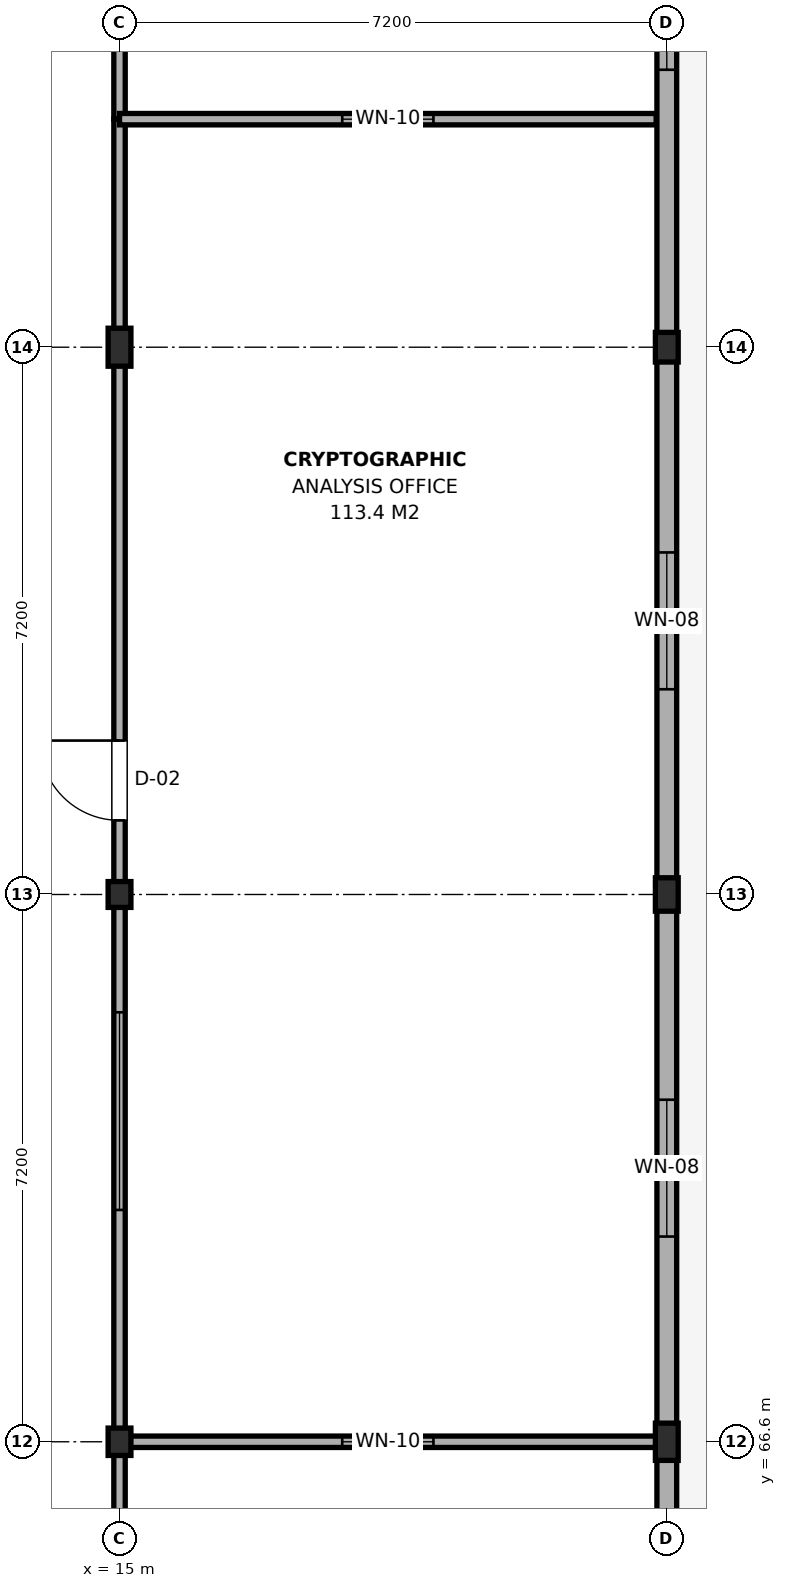
"""IFC4 building model, lengths in metres.
Left out: names, types, materials, properties, quantities, classifications, styles, units other than length and angle.
Written with IfcOpenShell. Run it as: python <this file> out.ifc"""

import sys

from ifc_helpers import new_model, si_unit, direction, frame, frame_2d, origin, origin_2d, place, context, subcontext, project, spatial, rectangle, i_section, extrude, element, fill, save


model = new_model("IFC4")
c1 = context("Model", 3, precision=1e-05, world=origin(), true_north=direction((0.0, 1.0)))
c2 = subcontext(c1, "Body", "Model", "MODEL_VIEW")
j1 = project(units=[si_unit("LENGTHUNIT", "METRE"), si_unit("PLANEANGLEUNIT", "RADIAN")], contexts=[c1])
p1 = place(None, origin())
s1 = spatial("IfcSite", under=j1, at=p1, CompositionType="ELEMENT")
p2 = place(p1, origin())
s2 = spatial("IfcBuilding", under=s1, at=p2, CompositionType="ELEMENT")
p3 = place(p2, frame((0.0, 0.0, 21.0)))
s3 = spatial("IfcBuildingStorey", under=s2, at=p3, CompositionType="ELEMENT", Elevation=21.0)
p4 = place(p3, frame((15.0, 66.6, 0.0), z_axis=(0.0, 0.0, 1.0), x_axis=(1.0, 0.0, 0.0)))
e1 = element("IfcColumn", 1, at=p4, inside=s3, PredefinedType="COLUMN", context=c2, shape_type="SweptSolid", body=[
    extrude(i_section(OverallWidth=0.3, OverallDepth=0.36, WebThickness=0.012, FlangeThickness=0.022, FilletRadius=0.027, at=origin_2d()), origin(), (0.0, 0.0, 1.0), 3.9),
])
p5 = place(p3, frame((15.0, 73.8, 0.0), z_axis=(0.0, 0.0, 1.0), x_axis=(1.0, 0.0, 0.0)))
e2 = element("IfcColumn", 2, at=p5, inside=s3, PredefinedType="COLUMN", context=c2, shape_type="SweptSolid", body=[
    extrude(i_section(OverallWidth=0.3, OverallDepth=0.34, WebThickness=0.012, FlangeThickness=0.021, FilletRadius=0.027, at=origin_2d()), origin(), (0.0, 0.0, 1.0), 3.9),
])
p6 = place(p3, frame((15.0, 81.0, 0.0), z_axis=(0.0, 0.0, 1.0), x_axis=(1.0, 0.0, 0.0)))
e3 = element("IfcColumn", 3, at=p6, inside=s3, PredefinedType="COLUMN", context=c2, shape_type="SweptSolid", body=[
    extrude(i_section(OverallWidth=0.3, OverallDepth=0.5, WebThickness=0.014, FlangeThickness=0.028, FilletRadius=0.027, at=origin_2d()), origin(), (0.0, 0.0, 1.0), 3.9),
])
p7 = place(p3, frame((22.2, 66.6, 0.0), z_axis=(0.0, 0.0, 1.0), x_axis=(1.0, 0.0, 0.0)))
e4 = element("IfcColumn", 4, at=p7, inside=s3, PredefinedType="COLUMN", context=c2, shape_type="SweptSolid", body=[
    extrude(i_section(OverallWidth=0.3, OverallDepth=0.49, WebThickness=0.012, FlangeThickness=0.023, FilletRadius=0.027, at=origin_2d()), origin(), (0.0, 0.0, 1.0), 3.9),
])
p8 = place(p3, frame((22.2, 73.8, 0.0), z_axis=(0.0, 0.0, 1.0), x_axis=(1.0, 0.0, 0.0)))
e5 = element("IfcColumn", 5, at=p8, inside=s3, PredefinedType="COLUMN", context=c2, shape_type="SweptSolid", body=[
    extrude(i_section(OverallWidth=0.3, OverallDepth=0.44, WebThickness=0.011, FlangeThickness=0.021, FilletRadius=0.027, at=origin_2d()), origin(), (0.0, 0.0, 1.0), 3.9),
])
p9 = place(p3, frame((22.2, 81.0, 0.0), z_axis=(0.0, 0.0, 1.0), x_axis=(1.0, 0.0, 0.0)))
e6 = element("IfcColumn", 6, at=p9, inside=s3, PredefinedType="COLUMN", context=c2, shape_type="SweptSolid", body=[
    extrude(i_section(OverallWidth=0.3, OverallDepth=0.39, WebThickness=0.011, FlangeThickness=0.019, FilletRadius=0.027, at=origin_2d()), origin(), (0.0, 0.0, 1.0), 3.9),
])
p10 = place(p3, frame((22.2, 58.8, 0.0), z_axis=(0.0, 0.0, 1.0), x_axis=(0.0, 1.0, 0.0)))
e7 = element("IfcWall", 7, at=p10, inside=s3, PredefinedType="SOLIDWALL", context=c2, shape_type="SweptSolid", body=[
    extrude(rectangle(XDim=7.8, YDim=0.26, at=frame_2d((3.9, 0.0))), origin(), (0.0, 0.0, 1.0), 3.245),
])
p11 = place(p10, frame((2.7, 0.0, 0.9)))
e8 = element("IfcOpeningElement", 8, at=p11, cuts=e7, PredefinedType="OPENING", context=c2, shape_type="SweptSolid", body=[
    extrude(rectangle(XDim=2.4, YDim=2.1, at=frame_2d((1.2, 1.05))), frame((0.0, 0.145, 0.0), z_axis=(0.0, -1.0, 0.0), x_axis=(1.0, 0.0, 0.0)), (0.0, 0.0, 1.0), 0.29),
])
p12 = place(p3, frame((22.2, 66.6, 0.0), z_axis=(0.0, 0.0, 1.0), x_axis=(0.0, 1.0, 0.0)))
e9 = element("IfcWall", 9, at=p12, inside=s3, PredefinedType="SOLIDWALL", context=c2, shape_type="SweptSolid", body=[
    extrude(rectangle(XDim=7.2, YDim=0.26, at=frame_2d((3.6, 0.0))), origin(), (0.0, 0.0, 1.0), 3.095),
])
p13 = place(p12, frame((2.7, 0.0, 0.65)))
e10 = element("IfcOpeningElement", 10, at=p13, cuts=e9, PredefinedType="OPENING", context=c2, shape_type="SweptSolid", body=[
    extrude(rectangle(XDim=1.8, YDim=1.2, at=frame_2d((0.9, 0.6))), frame((0.0, 0.145, 0.0), z_axis=(0.0, -1.0, 0.0), x_axis=(1.0, 0.0, 0.0)), (0.0, 0.0, 1.0), 0.29),
])
p14 = place(p3, frame((22.2, 73.8, 0.0), z_axis=(0.0, 0.0, 1.0), x_axis=(0.0, 1.0, 0.0)))
e11 = element("IfcWall", 11, at=p14, inside=s3, PredefinedType="SOLIDWALL", context=c2, shape_type="SweptSolid", body=[
    extrude(rectangle(XDim=7.2, YDim=0.26, at=frame_2d((3.6, 0.0))), origin(), (0.0, 0.0, 1.0), 3.095),
])
p15 = place(p14, frame((2.7, 0.0, 0.65)))
e12 = element("IfcOpeningElement", 12, at=p15, cuts=e11, PredefinedType="OPENING", context=c2, shape_type="SweptSolid", body=[
    extrude(rectangle(XDim=1.8, YDim=1.2, at=frame_2d((0.9, 0.6))), frame((0.0, 0.145, 0.0), z_axis=(0.0, -1.0, 0.0), x_axis=(1.0, 0.0, 0.0)), (0.0, 0.0, 1.0), 0.29),
])
p16 = place(p3, frame((22.2, 81.0, 0.0), z_axis=(0.0, 0.0, 1.0), x_axis=(0.0, 1.0, 0.0)))
e13 = element("IfcWall", 13, at=p16, inside=s3, PredefinedType="SOLIDWALL", context=c2, shape_type="SweptSolid", body=[
    extrude(rectangle(XDim=7.2, YDim=0.26, at=frame_2d((3.6, 0.0))), origin(), (0.0, 0.0, 1.0), 3.095),
])
p17 = place(p16, frame((3.65, 0.0, 0.65)))
e14 = element("IfcOpeningElement", 14, at=p17, cuts=e13, PredefinedType="OPENING", context=c2, shape_type="SweptSolid", body=[
    extrude(rectangle(XDim=1.8, YDim=1.2, at=frame_2d((0.9, 0.6))), frame((0.0, 0.145, 0.0), z_axis=(0.0, -1.0, 0.0), x_axis=(1.0, 0.0, 0.0)), (0.0, 0.0, 1.0), 0.29),
])
p18 = place(p3, frame((15.0, 50.4, 0.0), z_axis=(0.0, 0.0, 1.0), x_axis=(0.0, 1.0, 0.0)))
e15 = element("IfcWall", 15, at=p18, inside=s3, PredefinedType="PARTITIONING", context=c2, shape_type="SweptSolid", body=[
    extrude(rectangle(XDim=16.2, YDim=0.15, at=frame_2d((8.1, 0.0))), origin(), (0.0, 0.0, 1.0), 3.095),
])
p19 = place(p18, frame((7.125, 0.0, 0.0)))
e16 = element("IfcOpeningElement", 16, at=p19, cuts=e15, PredefinedType="OPENING", context=c2, shape_type="SweptSolid", body=[
    extrude(rectangle(XDim=1.05, YDim=2.15, at=frame_2d((0.525, 1.075))), frame((0.0, 0.09, 0.0), z_axis=(0.0, -1.0, 0.0), x_axis=(1.0, 0.0, 0.0)), (0.0, 0.0, 1.0), 0.18),
])
p20 = place(p18, frame((10.85, 0.0, 0.95)))
e17 = element("IfcOpeningElement", 17, at=p20, cuts=e15, PredefinedType="OPENING", context=c2, shape_type="SweptSolid", body=[
    extrude(rectangle(XDim=2.6, YDim=1.5, at=frame_2d((1.3, 0.75))), frame((0.0, 0.09, 0.0), z_axis=(0.0, -1.0, 0.0), x_axis=(1.0, 0.0, 0.0)), (0.0, 0.0, 1.0), 0.18),
])
p21 = place(p3, frame((15.0, 66.6, 0.0), z_axis=(0.0, 0.0, 1.0), x_axis=(0.0, 1.0, 0.0)))
e18 = element("IfcWall", 18, at=p21, inside=s3, PredefinedType="PARTITIONING", context=c2, shape_type="SweptSolid", body=[
    extrude(rectangle(XDim=17.4, YDim=0.15, at=frame_2d((8.7, 0.0))), origin(), (0.0, 0.0, 1.0), 3.095),
])
p22 = place(p21, frame((8.175, 0.0, 0.0)))
e19 = element("IfcOpeningElement", 19, at=p22, cuts=e18, PredefinedType="OPENING", context=c2, shape_type="SweptSolid", body=[
    extrude(rectangle(XDim=1.05, YDim=2.15, at=frame_2d((0.525, 1.075))), frame((0.0, 0.09, 0.0), z_axis=(0.0, -1.0, 0.0), x_axis=(1.0, 0.0, 0.0)), (0.0, 0.0, 1.0), 0.18),
])
p23 = place(p21, frame((3.05, 0.0, 0.95)))
e20 = element("IfcOpeningElement", 20, at=p23, cuts=e18, PredefinedType="OPENING", context=c2, shape_type="SweptSolid", body=[
    extrude(rectangle(XDim=2.6, YDim=1.5, at=frame_2d((1.3, 0.75))), frame((0.0, 0.09, 0.0), z_axis=(0.0, -1.0, 0.0), x_axis=(1.0, 0.0, 0.0)), (0.0, 0.0, 1.0), 0.18),
])
p24 = place(p3, frame((15.0, 66.6, 0.0), z_axis=(0.0, 0.0, 1.0), x_axis=(1.0, 0.0, 0.0)))
e21 = element("IfcWall", 21, at=p24, inside=s3, PredefinedType="PARTITIONING", context=c2, shape_type="SweptSolid", body=[
    extrude(rectangle(XDim=7.06, YDim=0.15, at=frame_2d((3.53, 0.0))), origin(), (0.0, 0.0, 1.0), 3.245),
])
p25 = place(p24, frame((2.93, 0.0, 0.95)))
e22 = element("IfcOpeningElement", 22, at=p25, cuts=e21, PredefinedType="OPENING", context=c2, shape_type="SweptSolid", body=[
    extrude(rectangle(XDim=1.2, YDim=1.5, at=frame_2d((0.6, 0.75))), frame((0.0, 0.09, 0.0), z_axis=(0.0, -1.0, 0.0), x_axis=(1.0, 0.0, 0.0)), (0.0, 0.0, 1.0), 0.18),
])
p26 = place(p3, frame((15.0, 84.0, 0.0), z_axis=(0.0, 0.0, 1.0), x_axis=(0.0, 1.0, 0.0)))
e23 = element("IfcWall", 23, at=p26, inside=s3, PredefinedType="PARTITIONING", context=c2, shape_type="SweptSolid", body=[
    extrude(rectangle(XDim=20.4, YDim=0.15, at=frame_2d((10.2, 0.0))), origin(), (0.0, 0.0, 1.0), 3.095),
])
p27 = place(p26, frame((9.4, 0.0, 0.0)))
e24 = element("IfcOpeningElement", 24, at=p27, cuts=e23, PredefinedType="OPENING", context=c2, shape_type="SweptSolid", body=[
    extrude(rectangle(XDim=1.6, YDim=2.15, at=frame_2d((0.8, 1.075))), frame((0.0, 0.09, 0.0), z_axis=(0.0, -1.0, 0.0), x_axis=(1.0, 0.0, 0.0)), (0.0, 0.0, 1.0), 0.18),
])
p28 = place(p26, frame((14.0, 0.0, 0.95)))
e25 = element("IfcOpeningElement", 25, at=p28, cuts=e23, PredefinedType="OPENING", context=c2, shape_type="SweptSolid", body=[
    extrude(rectangle(XDim=2.6, YDim=1.5, at=frame_2d((1.3, 0.75))), frame((0.0, 0.09, 0.0), z_axis=(0.0, -1.0, 0.0), x_axis=(1.0, 0.0, 0.0)), (0.0, 0.0, 1.0), 0.18),
])
p29 = place(p3, frame((15.0, 84.0, 0.0), z_axis=(0.0, 0.0, 1.0), x_axis=(1.0, 0.0, 0.0)))
e26 = element("IfcWall", 26, at=p29, inside=s3, PredefinedType="PARTITIONING", context=c2, shape_type="SweptSolid", body=[
    extrude(rectangle(XDim=7.06, YDim=0.15, at=frame_2d((3.53, 0.0))), origin(), (0.0, 0.0, 1.0), 3.145),
])
p30 = place(p29, frame((2.93, 0.0, 0.95)))
e27 = element("IfcOpeningElement", 27, at=p30, cuts=e26, PredefinedType="OPENING", context=c2, shape_type="SweptSolid", body=[
    extrude(rectangle(XDim=1.2, YDim=1.5, at=frame_2d((0.6, 0.75))), frame((0.0, 0.09, 0.0), z_axis=(0.0, -1.0, 0.0), x_axis=(1.0, 0.0, 0.0)), (0.0, 0.0, 1.0), 0.18),
])
p31 = place(p13, origin())
e28 = element("IfcWindow", 28, at=p31, inside=s3, PartitioningType="SINGLE_PANEL", PredefinedType="WINDOW", context=c2, shape_type="SweptSolid", body=[
    extrude(rectangle(XDim=1.8, YDim=1.2, at=frame_2d((0.9, 0.6))), frame((0.0, 0.03, 0.0), z_axis=(0.0, -1.0, 0.0), x_axis=(1.0, 0.0, 0.0)), (0.0, 0.0, 1.0), 0.06),
])
fill(e10, e28)
p32 = place(p15, origin())
e29 = element("IfcWindow", 29, at=p32, inside=s3, PartitioningType="SINGLE_PANEL", PredefinedType="WINDOW", context=c2, shape_type="SweptSolid", body=[
    extrude(rectangle(XDim=1.8, YDim=1.2, at=frame_2d((0.9, 0.6))), frame((0.0, 0.03, 0.0), z_axis=(0.0, -1.0, 0.0), x_axis=(1.0, 0.0, 0.0)), (0.0, 0.0, 1.0), 0.06),
])
fill(e12, e29)
p33 = place(p17, origin())
e30 = element("IfcWindow", 30, at=p33, inside=s3, PartitioningType="SINGLE_PANEL", PredefinedType="WINDOW", context=c2, shape_type="SweptSolid", body=[
    extrude(rectangle(XDim=1.8, YDim=1.2, at=frame_2d((0.9, 0.6))), frame((0.0, 0.03, 0.0), z_axis=(0.0, -1.0, 0.0), x_axis=(1.0, 0.0, 0.0)), (0.0, 0.0, 1.0), 0.06),
])
fill(e14, e30)
p34 = place(p22, origin())
e31 = element("IfcDoor", 31, at=p34, inside=s3, OperationType="SINGLE_SWING_RIGHT", PredefinedType="DOOR", context=c2, shape_type="SweptSolid", body=[
    extrude(rectangle(XDim=1.05, YDim=2.15, at=frame_2d((0.525, 1.075))), frame((0.0, 0.025, 0.0), z_axis=(0.0, -1.0, 0.0), x_axis=(1.0, 0.0, 0.0)), (0.0, 0.0, 1.0), 0.05),
])
fill(e19, e31)
p35 = place(p23, origin())
e32 = element("IfcWindow", 32, at=p35, inside=s3, PartitioningType="SINGLE_PANEL", PredefinedType="WINDOW", context=c2, shape_type="SweptSolid", body=[
    extrude(rectangle(XDim=2.6, YDim=1.5, at=frame_2d((1.3, 0.75))), frame((0.0, 0.03, 0.0), z_axis=(0.0, -1.0, 0.0), x_axis=(1.0, 0.0, 0.0)), (0.0, 0.0, 1.0), 0.06),
])
fill(e20, e32)
p36 = place(p25, origin())
e33 = element("IfcWindow", 33, at=p36, inside=s3, PartitioningType="SINGLE_PANEL", PredefinedType="WINDOW", context=c2, shape_type="SweptSolid", body=[
    extrude(rectangle(XDim=1.2, YDim=1.5, at=frame_2d((0.6, 0.75))), frame((0.0, 0.03, 0.0), z_axis=(0.0, -1.0, 0.0), x_axis=(1.0, 0.0, 0.0)), (0.0, 0.0, 1.0), 0.06),
])
fill(e22, e33)
p37 = place(p30, origin())
e34 = element("IfcWindow", 34, at=p37, inside=s3, PartitioningType="SINGLE_PANEL", PredefinedType="WINDOW", context=c2, shape_type="SweptSolid", body=[
    extrude(rectangle(XDim=1.2, YDim=1.5, at=frame_2d((0.6, 0.75))), frame((0.0, 0.03, 0.0), z_axis=(0.0, -1.0, 0.0), x_axis=(1.0, 0.0, 0.0)), (0.0, 0.0, 1.0), 0.06),
])
fill(e27, e34)
save(model, sys.argv[1])
